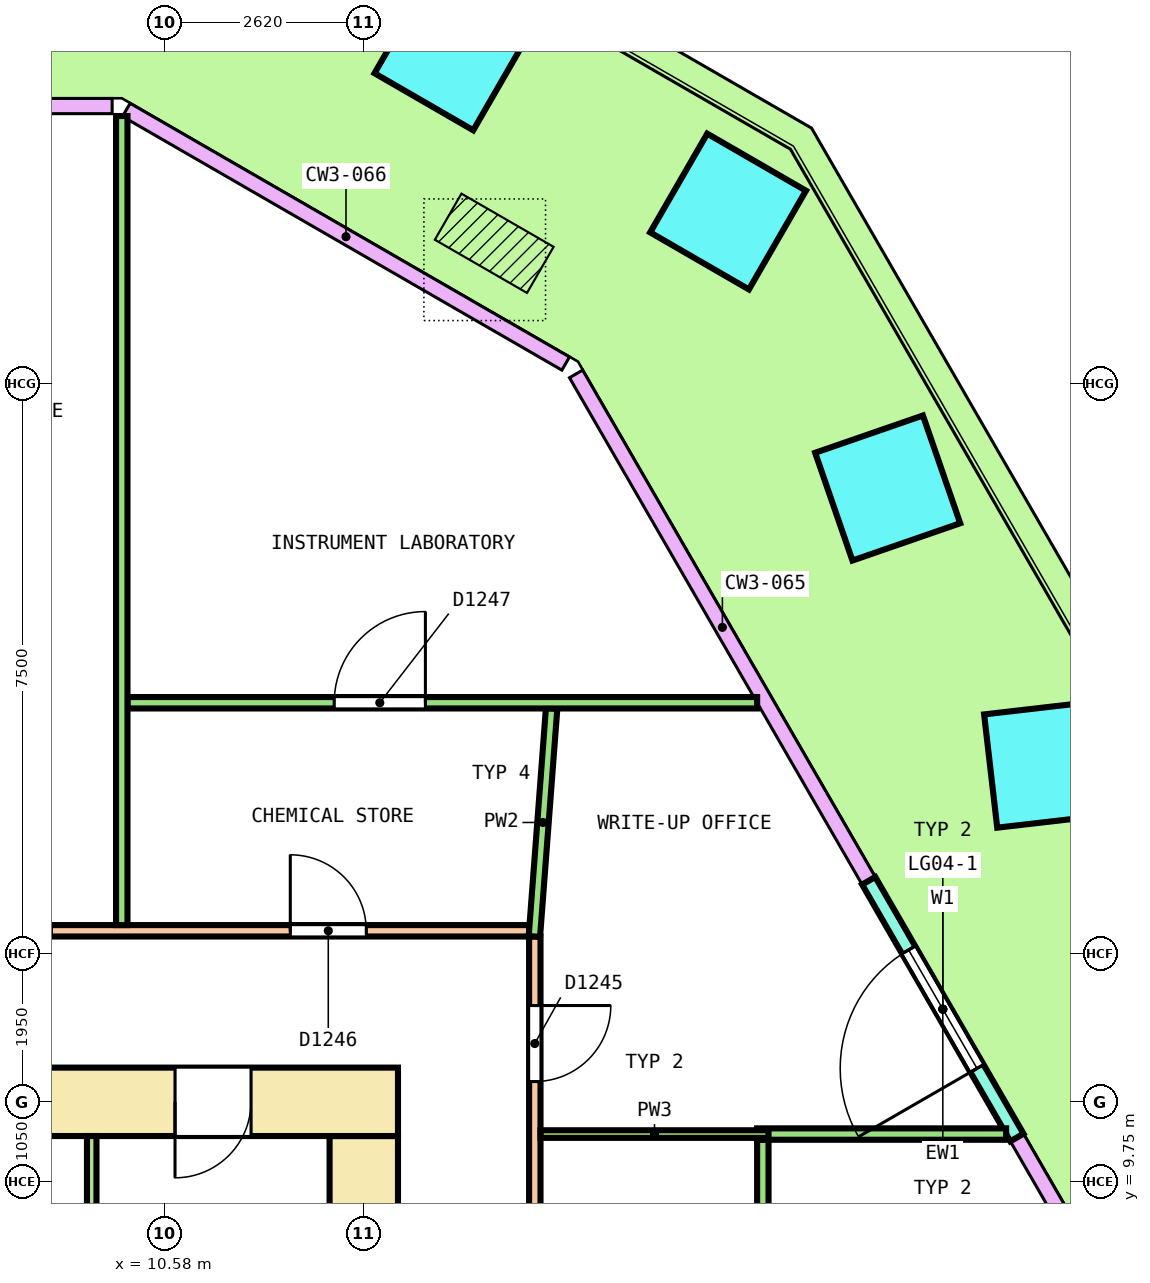
"""IFC4 building model, lengths in metres.
Left out: names, types, materials, properties, quantities, classifications, styles, units other than length and angle.
Written with IfcOpenShell. Run it as: python <this file> out.ifc"""

import sys

from ifc_helpers import new_model, si_unit, direction, frame, frame_2d, origin, origin_2d, place, context, subcontext, project, spatial, rectangle, extrude, element, fill, save


model = new_model("IFC4")
c1 = context("Model", 3, precision=1e-05, world=origin(), true_north=direction((0.0, 1.0)))
c2 = subcontext(c1, "Body", "Model", "MODEL_VIEW")
j1 = project(units=[si_unit("LENGTHUNIT", "METRE"), si_unit("PLANEANGLEUNIT", "RADIAN")], contexts=[c1])
p1 = place(None, origin())
s1 = spatial("IfcSite", under=j1, at=p1, CompositionType="ELEMENT")
p2 = place(p1, origin())
s2 = spatial("IfcBuilding", under=s1, at=p2, CompositionType="ELEMENT")
p3 = place(p2, frame((0.0, 0.0, 19.0)))
s3 = spatial("IfcBuildingStorey", under=s2, at=p3, CompositionType="ELEMENT", Elevation=19.0)
p4 = place(p3, frame((22.193, 15.238, 0.0), z_axis=(0.029040838643, 0.012592396839, 0.999498905068), x_axis=(-0.500555205851, 0.86569697754, 0.003637165647)))
e1 = element("IfcColumn", 1, at=p4, inside=s3, PredefinedType="COLUMN", context=c2, shape_type="SweptSolid", body=[
    extrude(rectangle(XDim=1.5, YDim=1.5, at=origin_2d()), origin(), (0.0, 0.0, 1.0), 4.052),
])
p5 = place(p3, frame((20.093, 18.875, 0.0), z_axis=(0.032654174822, 0.006325993277, 0.999446690262), x_axis=(-0.500478631698, 0.865680616164, 0.010872442804)))
e2 = element("IfcColumn", 2, at=p5, inside=s3, PredefinedType="COLUMN", context=c2, shape_type="SweptSolid", body=[
    extrude(rectangle(XDim=1.5, YDim=1.5, at=origin_2d()), origin(), (0.0, 0.0, 1.0), 4.052),
])
for number, where, z_axis, x_axis in (
    (3, (17.993, 22.512, 0.0), (0.036, 0.0, 0.999), (-0.865, 0.5, 0.031)),
    (4, (14.366, 24.606, 0.0), (0.036, 0.0, 0.999), (-0.865, 0.5, 0.031)),
):
    element("IfcColumn", number, at=place(p3, frame(where, z_axis=z_axis, x_axis=x_axis)), inside=s3, PredefinedType="COLUMN", context=c2, shape_type="SweptSolid", body=[
        extrude(rectangle(XDim=1.5, YDim=1.5, at=origin_2d()), origin(), (0.0, 0.0, 1.0), 4.053),
    ])
p6 = place(p3, frame((21.793, 10.33, 0.0), z_axis=(0.0, 0.0, 1.0), x_axis=(-0.499997012787, 0.866027128446, 0.0)))
e5 = element("IfcWall", 5, at=p6, inside=s3, PredefinedType="SOLIDWALL", context=c2, shape_type="SweptSolid", body=[
    extrude(rectangle(XDim=3.9, YDim=0.2, at=frame_2d((1.95, 0.0))), origin(), (0.0, 0.0, 1.0), 4.1),
])
p7 = place(p6, frame((1.05, 0.0, 0.0)))
e6 = element("IfcOpeningElement", 6, at=p7, cuts=e5, PredefinedType="OPENING", context=c2, shape_type="SweptSolid", body=[
    extrude(rectangle(XDim=1.8, YDim=2.4, at=frame_2d((0.9, 1.2))), frame((0.0, 0.11, 0.0), z_axis=(0.0, -1.0, 0.0), x_axis=(1.0, 0.0, 0.0)), (0.0, 0.0, 1.0), 0.22),
])
p8 = place(p6, frame((1.05, 0.0, 2.55)))
e7 = element("IfcOpeningElement", 7, at=p8, cuts=e5, PredefinedType="OPENING", context=c2, shape_type="SweptSolid", body=[
    extrude(rectangle(XDim=1.8, YDim=0.45, at=frame_2d((0.9, 0.225))), frame((0.0, 0.11, 0.0), z_axis=(0.0, -1.0, 0.0), x_axis=(1.0, 0.0, 0.0)), (0.0, 0.0, 1.0), 0.22),
])
p9 = place(p3, frame((-13.65, 10.8, 0.0), z_axis=(0.0, 0.0, 1.0), x_axis=(1.0, 0.0, 0.0)))
e8 = element("IfcWall", 8, at=p9, inside=s3, PredefinedType="SHEAR", context=c2, shape_type="SweptSolid", body=[
    extrude(rectangle(XDim=27.3, YDim=0.9, at=frame_2d((13.65, 0.0))), origin(), (0.0, 0.0, 1.0), 4.1),
])
p10 = place(p9, frame((1.892, 0.0, 0.0)))
e9 = element("IfcOpeningElement", 9, at=p10, cuts=e8, PredefinedType="OPENING", context=c2, shape_type="SweptSolid", body=[
    extrude(rectangle(XDim=1.0, YDim=2.1, at=frame_2d((0.5, 1.05))), frame((0.0, 0.46, 0.0), z_axis=(0.0, -1.0, 0.0), x_axis=(1.0, 0.0, 0.0)), (0.0, 0.0, 1.0), 0.92),
])
p11 = place(p9, frame((4.97, 0.0, 0.0)))
e10 = element("IfcOpeningElement", 10, at=p11, cuts=e8, PredefinedType="OPENING", context=c2, shape_type="SweptSolid", body=[
    extrude(rectangle(XDim=1.0, YDim=2.1, at=frame_2d((0.5, 1.05))), frame((0.0, 0.46, 0.0), z_axis=(0.0, -1.0, 0.0), x_axis=(1.0, 0.0, 0.0)), (0.0, 0.0, 1.0), 0.92),
])
p12 = place(p9, frame((8.017, 0.0, 0.0)))
e11 = element("IfcOpeningElement", 11, at=p12, cuts=e8, PredefinedType="OPENING", context=c2, shape_type="SweptSolid", body=[
    extrude(rectangle(XDim=1.0, YDim=2.1, at=frame_2d((0.5, 1.05))), frame((0.0, 0.46, 0.0), z_axis=(0.0, -1.0, 0.0), x_axis=(1.0, 0.0, 0.0)), (0.0, 0.0, 1.0), 0.92),
])
p13 = place(p9, frame((11.064, 0.0, 0.0)))
e12 = element("IfcOpeningElement", 12, at=p13, cuts=e8, PredefinedType="OPENING", context=c2, shape_type="SweptSolid", body=[
    extrude(rectangle(XDim=1.0, YDim=2.1, at=frame_2d((0.5, 1.05))), frame((0.0, 0.46, 0.0), z_axis=(0.0, -1.0, 0.0), x_axis=(1.0, 0.0, 0.0)), (0.0, 0.0, 1.0), 0.92),
])
p14 = place(p9, frame((18.077, 0.0, 0.0)))
e13 = element("IfcOpeningElement", 13, at=p14, cuts=e8, PredefinedType="OPENING", context=c2, shape_type="SweptSolid", body=[
    extrude(rectangle(XDim=1.0, YDim=2.1, at=frame_2d((0.5, 1.05))), frame((0.0, 0.46, 0.0), z_axis=(0.0, -1.0, 0.0), x_axis=(1.0, 0.0, 0.0)), (0.0, 0.0, 1.0), 0.92),
])
p15 = place(p9, frame((21.206, 0.0, 0.0)))
e14 = element("IfcOpeningElement", 14, at=p15, cuts=e8, PredefinedType="OPENING", context=c2, shape_type="SweptSolid", body=[
    extrude(rectangle(XDim=1.0, YDim=2.1, at=frame_2d((0.5, 1.05))), frame((0.0, 0.46, 0.0), z_axis=(0.0, -1.0, 0.0), x_axis=(1.0, 0.0, 0.0)), (0.0, 0.0, 1.0), 0.92),
])
p16 = place(p9, frame((24.367, 0.0, 0.0)))
e15 = element("IfcOpeningElement", 15, at=p16, cuts=e8, PredefinedType="OPENING", context=c2, shape_type="SweptSolid", body=[
    extrude(rectangle(XDim=1.0, YDim=2.1, at=frame_2d((0.5, 1.05))), frame((0.0, 0.46, 0.0), z_axis=(0.0, -1.0, 0.0), x_axis=(1.0, 0.0, 0.0)), (0.0, 0.0, 1.0), 0.92),
])
p17 = place(p9, frame((14.575, 0.0, 0.0)))
e16 = element("IfcOpeningElement", 16, at=p17, cuts=e8, PredefinedType="OPENING", context=c2, shape_type="SweptSolid", body=[
    extrude(rectangle(XDim=1.4, YDim=2.1, at=frame_2d((0.7, 1.05))), frame((0.0, 0.46, 0.0), z_axis=(0.0, -1.0, 0.0), x_axis=(1.0, 0.0, 0.0)), (0.0, 0.0, 1.0), 0.92),
])
p18 = place(p3, frame((13.2, -10.35, 0.0), z_axis=(0.0, 0.0, 1.0), x_axis=(0.0, 1.0, 0.0)))
e17 = element("IfcWall", 17, at=p18, inside=s3, PredefinedType="SHEAR", context=c2, shape_type="SweptSolid", body=[
    extrude(rectangle(XDim=20.7, YDim=0.9, at=frame_2d((10.35, 0.0))), origin(), (0.0, 0.0, 1.0), 4.1),
])
p19 = place(p18, frame((9.15, 0.0, 0.0)))
e18 = element("IfcOpeningElement", 18, at=p19, cuts=e17, PredefinedType="OPENING", context=c2, shape_type="SweptSolid", body=[
    extrude(rectangle(XDim=2.4, YDim=2.1, at=frame_2d((1.2, 1.05))), frame((0.0, 0.46, 0.0), z_axis=(0.0, -1.0, 0.0), x_axis=(1.0, 0.0, 0.0)), (0.0, 0.0, 1.0), 0.92),
])
p20 = place(p18, frame((16.05, 0.0, 0.0)))
e19 = element("IfcOpeningElement", 19, at=p20, cuts=e17, PredefinedType="OPENING", context=c2, shape_type="SweptSolid", body=[
    extrude(rectangle(XDim=1.2, YDim=2.1, at=frame_2d((0.6, 1.05))), frame((0.0, 0.46, 0.0), z_axis=(0.0, -1.0, 0.0), x_axis=(1.0, 0.0, 0.0)), (0.0, 0.0, 1.0), 0.92),
])
p21 = place(p18, frame((3.55, 0.0, 0.0)))
e20 = element("IfcOpeningElement", 20, at=p21, cuts=e17, PredefinedType="OPENING", context=c2, shape_type="SweptSolid", body=[
    extrude(rectangle(XDim=1.0, YDim=2.1, at=frame_2d((0.5, 1.05))), frame((0.0, 0.46, 0.0), z_axis=(0.0, -1.0, 0.0), x_axis=(1.0, 0.0, 0.0)), (0.0, 0.0, 1.0), 0.92),
])
p22 = place(p3, frame((9.621, 8.5, 0.0), z_axis=(0.0, 0.0, 1.0), x_axis=(0.0, 1.0, 0.0)))
e21 = element("IfcWall", 21, at=p22, inside=s3, PredefinedType="PARTITIONING", context=c2, shape_type="SweptSolid", body=[
    extrude(rectangle(XDim=1.85, YDim=0.125, at=frame_2d((0.925, 0.0))), origin(), (0.0, 0.0, 1.0), 4.1),
])
p23 = place(p3, frame((15.45, -12.975, 0.0), z_axis=(0.0, 0.0, 1.0), x_axis=(0.0, 1.0, 0.0)))
e22 = element("IfcWall", 22, at=p23, inside=s3, PredefinedType="PARTITIONING", context=c2, shape_type="SweptSolid", body=[
    extrude(rectangle(XDim=25.95, YDim=0.15, at=frame_2d((12.975, 0.0))), origin(), (0.0, 0.0, 1.0), 3.05),
])
p24 = place(p23, frame((12.95, 0.0, 0.0)))
e23 = element("IfcOpeningElement", 23, at=p24, cuts=e22, PredefinedType="OPENING", context=c2, shape_type="SweptSolid", body=[
    extrude(rectangle(XDim=1.2, YDim=2.1, at=frame_2d((0.6, 1.05))), frame((0.0, 0.085, 0.0), z_axis=(0.0, -1.0, 0.0), x_axis=(1.0, 0.0, 0.0)), (0.0, 0.0, 1.0), 0.17),
])
p25 = place(p23, frame((24.042, 0.0, 0.0)))
e24 = element("IfcOpeningElement", 24, at=p25, cuts=e22, PredefinedType="OPENING", context=c2, shape_type="SweptSolid", body=[
    extrude(rectangle(XDim=1.0, YDim=2.1, at=frame_2d((0.5, 1.05))), frame((0.0, 0.085, 0.0), z_axis=(0.0, -1.0, 0.0), x_axis=(1.0, 0.0, 0.0)), (0.0, 0.0, 1.0), 0.17),
])
p26 = place(p23, frame((4.287, 0.0, 0.0)))
e25 = element("IfcOpeningElement", 25, at=p26, cuts=e22, PredefinedType="OPENING", context=c2, shape_type="SweptSolid", body=[
    extrude(rectangle(XDim=1.0, YDim=2.1, at=frame_2d((0.5, 1.05))), frame((0.0, 0.085, 0.0), z_axis=(0.0, -1.0, 0.0), x_axis=(1.0, 0.0, 0.0)), (0.0, 0.0, 1.0), 0.17),
])
p27 = place(p3, frame((-15.375, 13.05, 0.0), z_axis=(0.0, 0.0, 1.0), x_axis=(1.0, 0.0, 0.0)))
e26 = element("IfcWall", 26, at=p27, inside=s3, PredefinedType="PARTITIONING", context=c2, shape_type="SweptSolid", body=[
    extrude(rectangle(XDim=30.75, YDim=0.15, at=frame_2d((15.375, 0.0))), origin(), (0.0, 0.0, 1.0), 3.05),
])
p28 = place(p27, frame((27.608, 0.0, 0.0)))
e27 = element("IfcOpeningElement", 27, at=p28, cuts=e26, PredefinedType="OPENING", context=c2, shape_type="SweptSolid", body=[
    extrude(rectangle(XDim=1.0, YDim=2.1, at=frame_2d((0.5, 1.05))), frame((0.0, 0.085, 0.0), z_axis=(0.0, -1.0, 0.0), x_axis=(1.0, 0.0, 0.0)), (0.0, 0.0, 1.0), 0.17),
])
p29 = place(p27, frame((23.465, 0.0, 0.0)))
e28 = element("IfcOpeningElement", 28, at=p29, cuts=e26, PredefinedType="OPENING", context=c2, shape_type="SweptSolid", body=[
    extrude(rectangle(XDim=1.0, YDim=2.1, at=frame_2d((0.5, 1.05))), frame((0.0, 0.085, 0.0), z_axis=(0.0, -1.0, 0.0), x_axis=(1.0, 0.0, 0.0)), (0.0, 0.0, 1.0), 0.17),
])
p30 = place(p27, frame((17.695, 0.0, 0.0)))
e29 = element("IfcOpeningElement", 29, at=p30, cuts=e26, PredefinedType="OPENING", context=c2, shape_type="SweptSolid", body=[
    extrude(rectangle(XDim=1.2, YDim=2.1, at=frame_2d((0.6, 1.05))), frame((0.0, 0.085, 0.0), z_axis=(0.0, -1.0, 0.0), x_axis=(1.0, 0.0, 0.0)), (0.0, 0.0, 1.0), 0.17),
])
p31 = place(p27, frame((11.084, 0.0, 0.0)))
e30 = element("IfcOpeningElement", 30, at=p31, cuts=e26, PredefinedType="OPENING", context=c2, shape_type="SweptSolid", body=[
    extrude(rectangle(XDim=1.2, YDim=2.1, at=frame_2d((0.6, 1.05))), frame((0.0, 0.085, 0.0), z_axis=(0.0, -1.0, 0.0), x_axis=(1.0, 0.0, 0.0)), (0.0, 0.0, 1.0), 0.17),
])
p32 = place(p27, frame((6.158, 0.0, 0.0)))
e31 = element("IfcOpeningElement", 31, at=p32, cuts=e26, PredefinedType="OPENING", context=c2, shape_type="SweptSolid", body=[
    extrude(rectangle(XDim=1.0, YDim=2.1, at=frame_2d((0.5, 1.05))), frame((0.0, 0.085, 0.0), z_axis=(0.0, -1.0, 0.0), x_axis=(1.0, 0.0, 0.0)), (0.0, 0.0, 1.0), 0.17),
])
p33 = place(p27, frame((0.825, 0.0, 0.0)))
e32 = element("IfcOpeningElement", 32, at=p33, cuts=e26, PredefinedType="OPENING", context=c2, shape_type="SweptSolid", body=[
    extrude(rectangle(XDim=1.0, YDim=2.1, at=frame_2d((0.5, 1.05))), frame((0.0, 0.085, 0.0), z_axis=(0.0, -1.0, 0.0), x_axis=(1.0, 0.0, 0.0)), (0.0, 0.0, 1.0), 0.17),
])
p34 = place(p3, frame((18.45, -13.449, 0.0), z_axis=(0.0, 0.0, 1.0), x_axis=(0.0, 1.0, 0.0)))
e33 = element("IfcWall", 33, at=p34, inside=s3, PredefinedType="PARTITIONING", context=c2, shape_type="SweptSolid", body=[
    extrude(rectangle(XDim=23.75, YDim=0.15, at=frame_2d((11.875, 0.0))), origin(), (0.0, 0.0, 1.0), 3.05),
])
p35 = place(p34, frame((19.324, 0.0, 0.0)))
e34 = element("IfcOpeningElement", 34, at=p35, cuts=e33, PredefinedType="OPENING", context=c2, shape_type="SweptSolid", body=[
    extrude(rectangle(XDim=1.2, YDim=2.1, at=frame_2d((0.6, 1.05))), frame((0.0, 0.085, 0.0), z_axis=(0.0, -1.0, 0.0), x_axis=(1.0, 0.0, 0.0)), (0.0, 0.0, 1.0), 0.17),
])
p36 = place(p34, frame((5.669, 0.0, 0.0)))
e35 = element("IfcOpeningElement", 35, at=p36, cuts=e33, PredefinedType="OPENING", context=c2, shape_type="SweptSolid", body=[
    extrude(rectangle(XDim=1.2, YDim=2.1, at=frame_2d((0.6, 1.05))), frame((0.0, 0.085, 0.0), z_axis=(0.0, -1.0, 0.0), x_axis=(1.0, 0.0, 0.0)), (0.0, 0.0, 1.0), 0.17),
])
p37 = place(p3, frame((18.375, 10.376, 0.0), z_axis=(0.0, 0.0, 1.0), x_axis=(1.0, 0.0, 0.0)))
e36 = element("IfcWall", 36, at=p37, inside=s3, PredefinedType="PARTITIONING", context=c2, shape_type="SweptSolid", body=[
    extrude(rectangle(XDim=3.276, YDim=0.15, at=frame_2d((1.638, 0.0))), origin(), (0.0, 0.0, 1.0), 3.05),
])
p38 = place(p3, frame((15.444, 12.975, 0.0), z_axis=(0.0, 0.0, 1.0), x_axis=(0.075387075765, 0.997154345529, 0.0)))
e37 = element("IfcWall", 37, at=p38, inside=s3, PredefinedType="PARTITIONING", context=c2, shape_type="SweptSolid", body=[
    extrude(rectangle(XDim=3.009, YDim=0.15, at=frame_2d((1.504, 0.0))), origin(), (0.0, 0.0, 1.0), 3.05),
])
p39 = place(p3, frame((10.091, 16.05, 0.0), z_axis=(0.0, 0.0, 1.0), x_axis=(1.0, 0.0, 0.0)))
e38 = element("IfcWall", 38, at=p39, inside=s3, PredefinedType="PARTITIONING", context=c2, shape_type="SweptSolid", body=[
    extrude(rectangle(XDim=8.284, YDim=0.15, at=frame_2d((4.142, 0.0))), origin(), (0.0, 0.0, 1.0), 3.05),
])
p40 = place(p39, frame((2.719, 0.0, 0.0)))
e39 = element("IfcOpeningElement", 39, at=p40, cuts=e38, PredefinedType="OPENING", context=c2, shape_type="SweptSolid", body=[
    extrude(rectangle(XDim=1.2, YDim=2.1, at=frame_2d((0.6, 1.05))), frame((0.0, 0.085, 0.0), z_axis=(0.0, -1.0, 0.0), x_axis=(1.0, 0.0, 0.0)), (0.0, 0.0, 1.0), 0.17),
])
p41 = place(p3, frame((10.016, 13.125, 0.0), z_axis=(0.0, 0.0, 1.0), x_axis=(0.0, 1.0, 0.0)))
e40 = element("IfcWall", 40, at=p41, inside=s3, PredefinedType="PARTITIONING", context=c2, shape_type="SweptSolid", body=[
    extrude(rectangle(XDim=10.644, YDim=0.15, at=frame_2d((5.322, 0.0))), origin(), (0.0, 0.0, 1.0), 3.05),
])
p42 = place(p3, frame((15.525, 10.376, 0.0), z_axis=(0.0, 0.0, 1.0), x_axis=(1.0, 0.0, 0.0)))
e41 = element("IfcWall", 41, at=p42, inside=s3, PredefinedType="PARTITIONING", context=c2, shape_type="SweptSolid", body=[
    extrude(rectangle(XDim=3.0, YDim=0.1, at=frame_2d((1.5, 0.0))), origin(), (0.0, 0.0, 1.0), 3.05),
])
p43 = place(p7, origin())
e42 = element("IfcDoor", 42, at=p43, inside=s3, OperationType="DOUBLE_DOOR_SINGLE_SWING", PredefinedType="DOOR", context=c2, shape_type="SweptSolid", body=[
    extrude(rectangle(XDim=1.8, YDim=2.4, at=frame_2d((0.9, 1.2))), frame((0.0, 0.025, 0.0), z_axis=(0.0, -1.0, 0.0), x_axis=(1.0, 0.0, 0.0)), (0.0, 0.0, 1.0), 0.05),
])
fill(e6, e42)
p44 = place(p8, origin())
e43 = element("IfcWindow", 43, at=p44, inside=s3, PartitioningType="SINGLE_PANEL", PredefinedType="WINDOW", context=c2, shape_type="SweptSolid", body=[
    extrude(rectangle(XDim=1.8, YDim=0.45, at=frame_2d((0.9, 0.225))), frame((0.0, 0.03, 0.0), z_axis=(0.0, -1.0, 0.0), x_axis=(1.0, 0.0, 0.0)), (0.0, 0.0, 1.0), 0.06),
])
fill(e7, e43)
p45 = place(p16, origin())
e44 = element("IfcDoor", 44, at=p45, inside=s3, OperationType="SINGLE_SWING_RIGHT", PredefinedType="DOOR", context=c2, shape_type="SweptSolid", body=[
    extrude(rectangle(XDim=1.0, YDim=2.1, at=frame_2d((0.5, 1.05))), frame((0.0, 0.3, 0.0), z_axis=(0.0, -1.0, 0.0), x_axis=(1.0, 0.0, 0.0)), (0.0, 0.0, 1.0), 0.6),
])
fill(e15, e44)
p46 = place(p25, origin())
e45 = element("IfcDoor", 45, at=p46, inside=s3, OperationType="SINGLE_SWING_RIGHT", PredefinedType="DOOR", context=c2, shape_type="SweptSolid", body=[
    extrude(rectangle(XDim=1.0, YDim=2.1, at=frame_2d((0.5, 1.05))), frame((0.0, 0.025, 0.0), z_axis=(0.0, -1.0, 0.0), x_axis=(1.0, 0.0, 0.0)), (0.0, 0.0, 1.0), 0.05),
])
fill(e24, e45)
p47 = place(p28, origin())
e46 = element("IfcDoor", 46, at=p47, inside=s3, OperationType="SINGLE_SWING_LEFT", PredefinedType="DOOR", context=c2, shape_type="SweptSolid", body=[
    extrude(rectangle(XDim=1.0, YDim=2.1, at=frame_2d((0.5, 1.05))), frame((0.0, 0.025, 0.0), z_axis=(0.0, -1.0, 0.0), x_axis=(1.0, 0.0, 0.0)), (0.0, 0.0, 1.0), 0.05),
])
fill(e27, e46)
p48 = place(p40, origin())
e47 = element("IfcDoor", 47, at=p48, inside=s3, OperationType="DOUBLE_DOOR_SINGLE_SWING", PredefinedType="DOOR", context=c2, shape_type="SweptSolid", body=[
    extrude(rectangle(XDim=1.2, YDim=2.1, at=frame_2d((0.6, 1.05))), frame((0.0, 0.025, 0.0), z_axis=(0.0, -1.0, 0.0), x_axis=(1.0, 0.0, 0.0)), (0.0, 0.0, 1.0), 0.05),
])
fill(e39, e47)
save(model, sys.argv[1])
